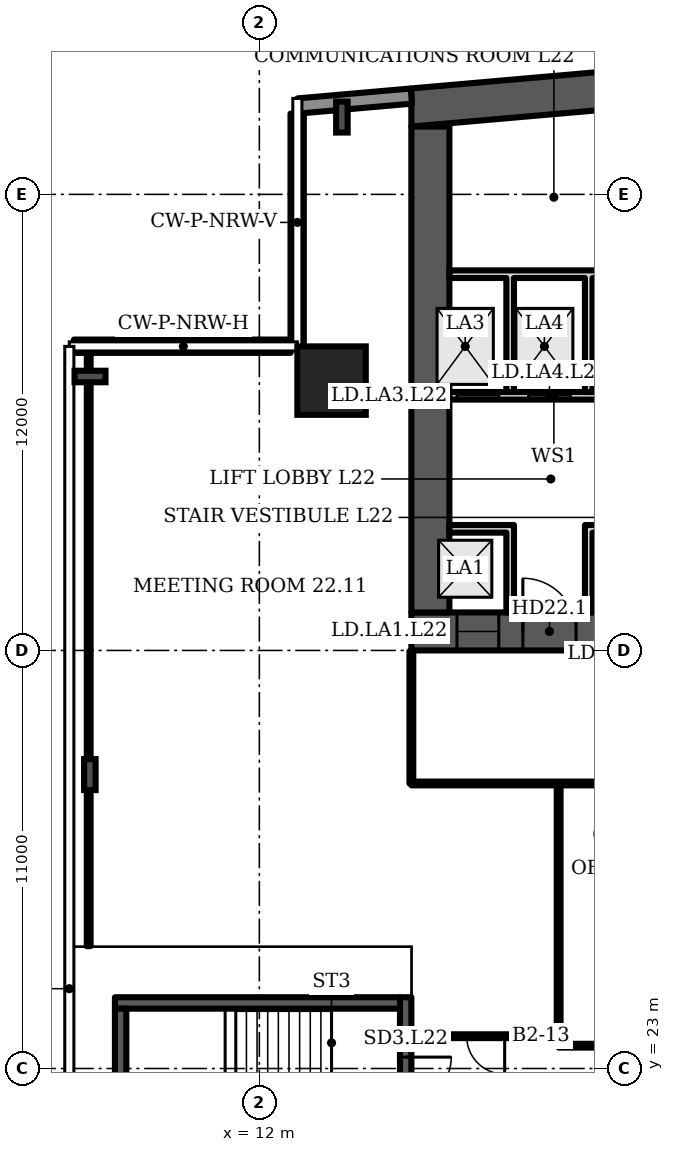
"""IFC4 building model, lengths in metres.
Left out: names, types, materials, properties, quantities, classifications, styles, units other than length and angle.
Written with IfcOpenShell. Run it as: python <this file> out.ifc"""

import sys

from ifc_helpers import new_model, si_unit, direction, frame, frame_2d, origin, origin_2d, place, context, subcontext, project, spatial, polyline, rectangle, i_section, outline, extrude, element, fill, save


model = new_model("IFC4")
c1 = context("Model", 3, precision=1e-05, world=origin(), true_north=direction((0.0, 1.0)))
c2 = subcontext(c1, "Body", "Model", "MODEL_VIEW")
j1 = project(units=[si_unit("LENGTHUNIT", "METRE"), si_unit("PLANEANGLEUNIT", "RADIAN")], contexts=[c1])
p1 = place(None, origin())
s1 = spatial("IfcSite", under=j1, at=p1, CompositionType="ELEMENT")
p2 = place(p1, origin())
s2 = spatial("IfcBuilding", under=s1, at=p2, CompositionType="ELEMENT")
p3 = place(p2, frame((0.0, 0.0, 100.3)))
s3 = spatial("IfcBuildingStorey", under=s2, at=p3, CompositionType="ELEMENT", Elevation=100.3)
p4 = place(p3, frame((0.0, 0.0, -0.0)))
e1 = element("IfcWall", 1, at=p4, inside=s3, PredefinedType="SHEAR", context=c2, shape_type="SweptSolid", body=[
    extrude(outline(polyline([(16.0, 47.784), (40.5, 49.927), (65.0, 47.784), (65.0, 48.787), (40.5, 50.931), (16.0, 48.787), (16.0, 47.784)])), origin(), (0.0, 0.0, 1.0), 3.6),
])
p5 = place(p3, frame((16.0, 34.5, 0.0), z_axis=(0.0, 0.0, 1.0), x_axis=(1.0, 0.0, 0.0)))
e2 = element("IfcWall", 2, at=p5, inside=s3, PredefinedType="SHEAR", context=c2, shape_type="SweptSolid", body=[
    extrude(rectangle(XDim=49.0, YDim=1.0, at=frame_2d((24.5, 0.0))), origin(), (0.0, 0.0, 1.0), 3.6),
])
p6 = place(p5, frame((1.2, 0.0, 0.0)))
e3 = element("IfcOpeningElement", 3, at=p6, cuts=e2, PredefinedType="OPENING", context=c2, shape_type="SweptSolid", body=[
    extrude(rectangle(XDim=1.1, YDim=2.1, at=frame_2d((0.55, 1.05))), frame((0.0, 0.51, 0.0), z_axis=(0.0, -1.0, 0.0), x_axis=(1.0, 0.0, 0.0)), (0.0, 0.0, 1.0), 1.02),
])
p7 = place(p5, frame((5.083, 0.0, 0.0)))
e4 = element("IfcOpeningElement", 4, at=p7, cuts=e2, PredefinedType="OPENING", context=c2, shape_type="SweptSolid", body=[
    extrude(rectangle(XDim=1.1, YDim=2.1, at=frame_2d((0.55, 1.05))), frame((0.0, 0.51, 0.0), z_axis=(0.0, -1.0, 0.0), x_axis=(1.0, 0.0, 0.0)), (0.0, 0.0, 1.0), 1.02),
])
p8 = place(p5, frame((2.933, 0.0, 0.0)))
e5 = element("IfcOpeningElement", 5, at=p8, cuts=e2, PredefinedType="OPENING", context=c2, shape_type="SweptSolid", body=[
    extrude(rectangle(XDim=1.4, YDim=2.1, at=frame_2d((0.7, 1.05))), frame((0.0, 0.51, 0.0), z_axis=(0.0, -1.0, 0.0), x_axis=(1.0, 0.0, 0.0)), (0.0, 0.0, 1.0), 1.02),
])
p9 = place(p5, frame((7.65, 0.0, 0.0)))
e6 = element("IfcOpeningElement", 6, at=p9, cuts=e2, PredefinedType="OPENING", context=c2, shape_type="SweptSolid", body=[
    extrude(rectangle(XDim=1.2, YDim=2.1, at=frame_2d((0.6, 1.05))), frame((0.0, 0.51, 0.0), z_axis=(0.0, -1.0, 0.0), x_axis=(1.0, 0.0, 0.0)), (0.0, 0.0, 1.0), 1.02),
])
p10 = place(p5, frame((14.817, 0.0, 0.0)))
e7 = element("IfcOpeningElement", 7, at=p10, cuts=e2, PredefinedType="OPENING", context=c2, shape_type="SweptSolid", body=[
    extrude(rectangle(XDim=1.1, YDim=2.1, at=frame_2d((0.55, 1.05))), frame((0.0, 0.51, 0.0), z_axis=(0.0, -1.0, 0.0), x_axis=(1.0, 0.0, 0.0)), (0.0, 0.0, 1.0), 1.02),
])
p11 = place(p5, frame((19.083, 0.0, 0.0)))
e8 = element("IfcOpeningElement", 8, at=p11, cuts=e2, PredefinedType="OPENING", context=c2, shape_type="SweptSolid", body=[
    extrude(rectangle(XDim=1.1, YDim=2.1, at=frame_2d((0.55, 1.05))), frame((0.0, 0.51, 0.0), z_axis=(0.0, -1.0, 0.0), x_axis=(1.0, 0.0, 0.0)), (0.0, 0.0, 1.0), 1.02),
])
p12 = place(p5, frame((16.8, 0.0, 0.0)))
e9 = element("IfcOpeningElement", 9, at=p12, cuts=e2, PredefinedType="OPENING", context=c2, shape_type="SweptSolid", body=[
    extrude(rectangle(XDim=1.4, YDim=2.1, at=frame_2d((0.7, 1.05))), frame((0.0, 0.51, 0.0), z_axis=(0.0, -1.0, 0.0), x_axis=(1.0, 0.0, 0.0)), (0.0, 0.0, 1.0), 1.02),
])
p13 = place(p5, frame((21.817, 0.0, 0.0)))
e10 = element("IfcOpeningElement", 10, at=p13, cuts=e2, PredefinedType="OPENING", context=c2, shape_type="SweptSolid", body=[
    extrude(rectangle(XDim=1.1, YDim=2.1, at=frame_2d((0.55, 1.05))), frame((0.0, 0.51, 0.0), z_axis=(0.0, -1.0, 0.0), x_axis=(1.0, 0.0, 0.0)), (0.0, 0.0, 1.0), 1.02),
])
p14 = place(p5, frame((26.083, 0.0, 0.0)))
e11 = element("IfcOpeningElement", 11, at=p14, cuts=e2, PredefinedType="OPENING", context=c2, shape_type="SweptSolid", body=[
    extrude(rectangle(XDim=1.1, YDim=2.1, at=frame_2d((0.55, 1.05))), frame((0.0, 0.51, 0.0), z_axis=(0.0, -1.0, 0.0), x_axis=(1.0, 0.0, 0.0)), (0.0, 0.0, 1.0), 1.02),
])
p15 = place(p5, frame((33.15, 0.0, 0.0)))
e12 = element("IfcOpeningElement", 12, at=p15, cuts=e2, PredefinedType="OPENING", context=c2, shape_type="SweptSolid", body=[
    extrude(rectangle(XDim=1.2, YDim=2.1, at=frame_2d((0.6, 1.05))), frame((0.0, 0.51, 0.0), z_axis=(0.0, -1.0, 0.0), x_axis=(1.0, 0.0, 0.0)), (0.0, 0.0, 1.0), 1.02),
])
p16 = place(p5, frame((37.8, 0.0, 0.0)))
e13 = element("IfcOpeningElement", 13, at=p16, cuts=e2, PredefinedType="OPENING", context=c2, shape_type="SweptSolid", body=[
    extrude(rectangle(XDim=1.4, YDim=2.1, at=frame_2d((0.7, 1.05))), frame((0.0, 0.51, 0.0), z_axis=(0.0, -1.0, 0.0), x_axis=(1.0, 0.0, 0.0)), (0.0, 0.0, 1.0), 1.02),
])
p17 = place(p5, frame((42.817, 0.0, 0.0)))
e14 = element("IfcOpeningElement", 14, at=p17, cuts=e2, PredefinedType="OPENING", context=c2, shape_type="SweptSolid", body=[
    extrude(rectangle(XDim=1.1, YDim=2.1, at=frame_2d((0.55, 1.05))), frame((0.0, 0.51, 0.0), z_axis=(0.0, -1.0, 0.0), x_axis=(1.0, 0.0, 0.0)), (0.0, 0.0, 1.0), 1.02),
])
p18 = place(p5, frame((46.7, 0.0, 0.0)))
e15 = element("IfcOpeningElement", 15, at=p18, cuts=e2, PredefinedType="OPENING", context=c2, shape_type="SweptSolid", body=[
    extrude(rectangle(XDim=1.1, YDim=2.1, at=frame_2d((0.55, 1.05))), frame((0.0, 0.51, 0.0), z_axis=(0.0, -1.0, 0.0), x_axis=(1.0, 0.0, 0.0)), (0.0, 0.0, 1.0), 1.02),
])
p19 = place(p5, frame((44.667, 0.0, 0.0)))
e16 = element("IfcOpeningElement", 16, at=p19, cuts=e2, PredefinedType="OPENING", context=c2, shape_type="SweptSolid", body=[
    extrude(rectangle(XDim=1.4, YDim=2.1, at=frame_2d((0.7, 1.05))), frame((0.0, 0.51, 0.0), z_axis=(0.0, -1.0, 0.0), x_axis=(1.0, 0.0, 0.0)), (0.0, 0.0, 1.0), 1.02),
])
p20 = place(p3, frame((16.5, 35.0, 0.0), z_axis=(0.0, 0.0, 1.0), x_axis=(0.0, 1.0, 0.0)))
e17 = element("IfcWall", 17, at=p20, inside=s3, PredefinedType="SHEAR", context=c2, shape_type="SweptSolid", body=[
    extrude(rectangle(XDim=12.784, YDim=1.0, at=frame_2d((6.392, 0.0))), origin(), (0.0, 0.0, 1.0), 3.6),
])
p21 = place(p3, frame((13.9, 41.1, 0.0), z_axis=(0.0, 0.0, 1.0), x_axis=(1.0, 0.0, 0.0)))
e18 = element("IfcColumn", 18, at=p21, inside=s3, PredefinedType="COLUMN", context=c2, shape_type="SweptSolid", body=[
    extrude(rectangle(XDim=1.8, YDim=1.8, at=origin_2d()), origin(), (0.0, 0.0, 1.0), 3.6),
])
for number, where, z_axis, x_axis in (
    (19, (14.172, 48.034, 0.0), (0.0, 0.0, 1.0), (-1.0, 0.0, 0.0)),
    (20, (7.544, 41.208, 0.0), (0.0, 0.0, 1.0), (0.0, 1.0, 0.0)),
    (21, (7.54, 30.733, 0.0), (0.0, 0.0, 1.0), (-1.0, 0.0, 0.0)),
):
    element("IfcColumn", number, at=place(p3, frame(where, z_axis=z_axis, x_axis=x_axis)), inside=s3, PredefinedType="COLUMN", context=c2, shape_type="SweptSolid", body=[
        extrude(i_section(OverallWidth=0.303, OverallDepth=0.814, WebThickness=0.021, FlangeThickness=0.04, FilletRadius=0.03, at=origin_2d()), origin(), (0.0, 0.0, 1.0), 3.6),
    ])
p22 = place(p3, frame((16.0, 48.587, 0.0), z_axis=(0.0, 0.0, 1.0), x_axis=(-0.996194, -0.087168, 0.0)))
e22 = element("IfcWall", 22, at=p22, inside=s3, PredefinedType="SOLIDWALL", context=c2, shape_type="SweptSolid", body=[
    extrude(rectangle(XDim=2.994, YDim=0.4, at=frame_2d((1.497, 0.0))), origin(), (0.0, 0.0, 1.0), 3.2),
])
p23 = place(p3, frame((12.995, 48.126, 0.0), z_axis=(0.0, 0.0, 1.0), x_axis=(0.0, -1.0, 0.0)))
e23 = element("IfcWall", 23, at=p23, inside=s3, PredefinedType="SOLIDWALL", context=c2, shape_type="SweptSolid", body=[
    extrude(rectangle(XDim=6.126, YDim=0.35, at=frame_2d((3.063, 0.0))), origin(), (0.0, 0.0, 1.0), 1.0),
])
p24 = place(p3, frame((12.82, 42.005, 0.0), z_axis=(0.0, 0.0, 1.0), x_axis=(-1.0, 0.0, 0.0)))
e24 = element("IfcWall", 24, at=p24, inside=s3, PredefinedType="SOLIDWALL", context=c2, shape_type="SweptSolid", body=[
    extrude(rectangle(XDim=5.7, YDim=0.35, at=frame_2d((2.85, 0.0))), origin(), (0.0, 0.0, 1.0), 1.0),
])
p25 = place(p3, frame((17.0, 40.7, 0.0), z_axis=(0.0, 0.0, 1.0), x_axis=(1.0, 0.0, 0.0)))
e25 = element("IfcWall", 25, at=p25, inside=s3, PredefinedType="PARTITIONING", context=c2, shape_type="SweptSolid", body=[
    extrude(rectangle(XDim=5.5, YDim=0.2, at=frame_2d((2.75, 0.0))), origin(), (0.0, 0.0, 1.0), 3.2),
])
p26 = place(p25, frame((0.2, 0.0, 0.0)))
e26 = element("IfcOpeningElement", 26, at=p26, cuts=e25, PredefinedType="OPENING", context=c2, shape_type="SweptSolid", body=[
    extrude(rectangle(XDim=1.1, YDim=2.1, at=frame_2d((0.55, 1.05))), frame((0.0, 0.11, 0.0), z_axis=(0.0, -1.0, 0.0), x_axis=(1.0, 0.0, 0.0)), (0.0, 0.0, 1.0), 0.22),
])
p27 = place(p25, frame((2.083, 0.0, 0.0)))
e27 = element("IfcOpeningElement", 27, at=p27, cuts=e25, PredefinedType="OPENING", context=c2, shape_type="SweptSolid", body=[
    extrude(rectangle(XDim=1.1, YDim=2.1, at=frame_2d((0.55, 1.05))), frame((0.0, 0.11, 0.0), z_axis=(0.0, -1.0, 0.0), x_axis=(1.0, 0.0, 0.0)), (0.0, 0.0, 1.0), 0.22),
])
p28 = place(p25, frame((4.083, 0.0, 0.0)))
e28 = element("IfcOpeningElement", 28, at=p28, cuts=e25, PredefinedType="OPENING", context=c2, shape_type="SweptSolid", body=[
    extrude(rectangle(XDim=1.1, YDim=2.1, at=frame_2d((0.55, 1.05))), frame((0.0, 0.11, 0.0), z_axis=(0.0, -1.0, 0.0), x_axis=(1.0, 0.0, 0.0)), (0.0, 0.0, 1.0), 0.22),
])
p29 = place(p3, frame((0.0, 0.0, -0.0)))
e29 = element("IfcWall", 29, at=p29, inside=s3, PredefinedType="PARTITIONING", context=c2, shape_type="SweptSolid", body=[
    extrude(outline(polyline([(18.5, 37.1), (17.0, 37.1), (17.0, 37.3), (18.5, 37.3), (18.7, 37.3), (18.7, 35.0), (18.5, 35.0), (18.5, 37.1)])), origin(), (0.0, 0.0, 1.0), 3.2),
])
p30 = place(p3, frame((0.0, 0.0, -0.0)))
e30 = element("IfcWall", 30, at=p30, inside=s3, PredefinedType="PARTITIONING", context=c2, shape_type="SweptSolid", body=[
    extrude(outline(polyline([(20.567, 37.3), (20.767, 37.3), (22.5, 37.3), (22.5, 37.1), (20.767, 37.1), (20.767, 35.0), (20.567, 35.0), (20.567, 37.3)])), origin(), (0.0, 0.0, 1.0), 3.2),
])
p31 = place(p3, frame((0.0, 0.0, -0.0)))
e31 = element("IfcWall", 31, at=p31, inside=s3, PredefinedType="PARTITIONING", context=c2, shape_type="SweptSolid", body=[
    extrude(outline(polyline([(18.7, 40.8), (18.5, 40.8), (18.5, 43.8), (17.0, 43.8), (17.0, 44.0), (22.5, 44.0), (22.5, 43.8), (20.767, 43.8), (20.767, 40.8), (20.567, 40.8), (20.567, 43.8), (18.7, 43.8), (18.7, 40.8)])), origin(), (0.0, 0.0, 1.0), 3.2),
])
p32 = place(p3, frame((15.85, 20.525, 0.0), z_axis=(0.0, 0.0, 1.0), x_axis=(0.0, 1.0, 0.0)))
e32 = element("IfcWall", 32, at=p32, inside=s3, PredefinedType="SHEAR", context=c2, shape_type="SweptSolid", body=[
    extrude(rectangle(XDim=4.35, YDim=0.3, at=frame_2d((2.175, 0.0))), origin(), (0.0, 0.0, 1.0), 3.2),
])
p33 = place(p32, frame((1.575, 0.0, 0.0)))
e33 = element("IfcOpeningElement", 33, at=p33, cuts=e32, PredefinedType="OPENING", context=c2, shape_type="SweptSolid", body=[
    extrude(rectangle(XDim=1.2, YDim=2.1, at=frame_2d((0.6, 1.05))), frame((0.0, 0.16, 0.0), z_axis=(0.0, -1.0, 0.0), x_axis=(1.0, 0.0, 0.0)), (0.0, 0.0, 1.0), 0.32),
])
p34 = place(p3, frame((7.51, 26.22, 0.0), z_axis=(0.0, 0.0, 1.0), x_axis=(0.0, 1.0, 0.0)))
e34 = element("IfcWall", 34, at=p34, inside=s3, PredefinedType="PARTITIONING", context=c2, shape_type="SweptSolid", body=[
    extrude(rectangle(XDim=15.76, YDim=0.1, at=frame_2d((7.88, 0.0))), origin(), (0.0, 0.0, 1.0), 2.58),
])
p35 = place(p3, frame((16.0, 30.5, 0.0), z_axis=(0.0, 0.0, 1.0), x_axis=(0.0, 1.0, 0.0)))
e35 = element("IfcWall", 35, at=p35, inside=s3, PredefinedType="PARTITIONING", context=c2, shape_type="SweptSolid", body=[
    extrude(rectangle(XDim=3.48, YDim=0.1, at=frame_2d((1.74, 0.0))), origin(), (0.0, 0.0, 1.0), 3.2),
])
p36 = place(p3, frame((16.0, 30.5, 0.0), z_axis=(0.0, 0.0, 1.0), x_axis=(1.0, 0.0, 0.0)))
e36 = element("IfcWall", 36, at=p36, inside=s3, PredefinedType="PARTITIONING", context=c2, shape_type="SweptSolid", body=[
    extrude(rectangle(XDim=20.85, YDim=0.1, at=frame_2d((10.425, 0.0))), origin(), (0.0, 0.0, 1.0), 3.2),
])
p37 = place(p36, frame((6.895, 0.0, 0.0)))
e37 = element("IfcOpeningElement", 37, at=p37, cuts=e36, PredefinedType="OPENING", context=c2, shape_type="SweptSolid", body=[
    extrude(rectangle(XDim=1.0, YDim=2.1, at=frame_2d((0.5, 1.05))), frame((0.0, 0.06, 0.0), z_axis=(0.0, -1.0, 0.0), x_axis=(1.0, 0.0, 0.0)), (0.0, 0.0, 1.0), 0.12),
])
p38 = place(p36, frame((15.37, 0.0, 0.0)))
e38 = element("IfcOpeningElement", 38, at=p38, cuts=e36, PredefinedType="OPENING", context=c2, shape_type="SweptSolid", body=[
    extrude(rectangle(XDim=1.0, YDim=2.1, at=frame_2d((0.5, 1.05))), frame((0.0, 0.06, 0.0), z_axis=(0.0, -1.0, 0.0), x_axis=(1.0, 0.0, 0.0)), (0.0, 0.0, 1.0), 0.12),
])
p39 = place(p3, frame((16.02, 23.85, 0.0), z_axis=(0.0, 0.0, 1.0), x_axis=(1.0, 0.0, 0.0)))
e39 = element("IfcWall", 39, at=p39, inside=s3, PredefinedType="PARTITIONING", context=c2, shape_type="SweptSolid", body=[
    extrude(rectangle(XDim=3.855, YDim=0.1, at=frame_2d((1.927, 0.0))), origin(), (0.0, 0.0, 1.0), 3.2),
])
p40 = place(p39, frame((1.435, 0.0, 0.0)))
e40 = element("IfcOpeningElement", 40, at=p40, cuts=e39, PredefinedType="OPENING", context=c2, shape_type="SweptSolid", body=[
    extrude(rectangle(XDim=1.0, YDim=2.1, at=frame_2d((0.5, 1.05))), frame((0.0, 0.06, 0.0), z_axis=(0.0, -1.0, 0.0), x_axis=(1.0, 0.0, 0.0)), (0.0, 0.0, 1.0), 0.12),
])
p41 = place(p3, frame((19.875, 23.6, 0.0), z_axis=(0.0, 0.0, 1.0), x_axis=(0.0, 1.0, 0.0)))
e41 = element("IfcWall", 41, at=p41, inside=s3, PredefinedType="PARTITIONING", context=c2, shape_type="SweptSolid", body=[
    extrude(rectangle(XDim=6.9, YDim=0.1, at=frame_2d((3.45, 0.0))), origin(), (0.0, 0.0, 1.0), 3.2),
])
p42 = place(p3, frame((19.875, 23.6, 0.0), z_axis=(0.0, 0.0, 1.0), x_axis=(1.0, 0.0, 0.0)))
e42 = element("IfcWall", 42, at=p42, inside=s3, PredefinedType="PARTITIONING", context=c2, shape_type="SweptSolid", body=[
    extrude(rectangle(XDim=1.325, YDim=0.1, at=frame_2d((0.663, 0.0))), origin(), (0.0, 0.0, 1.0), 3.2),
])
p43 = place(p3, frame((8.2, 24.725, 0.0), z_axis=(0.0, 0.0, 1.0), x_axis=(1.0, 0.0, 0.0)))
e43 = element("IfcWall", 43, at=p43, inside=s3, PredefinedType="SHEAR", context=c2, shape_type="SweptSolid", body=[
    extrude(rectangle(XDim=7.5, YDim=0.3, at=frame_2d((3.75, 0.0))), origin(), (0.0, 0.0, 1.0), 3.2),
])
p44 = place(p3, frame((8.35, 20.825, 0.0), z_axis=(0.0, 0.0, 1.0), x_axis=(0.0, 1.0, 0.0)))
e44 = element("IfcWall", 44, at=p44, inside=s3, PredefinedType="SHEAR", context=c2, shape_type="SweptSolid", body=[
    extrude(rectangle(XDim=3.75, YDim=0.3, at=frame_2d((1.875, 0.0))), origin(), (0.0, 0.0, 1.0), 3.2),
])
p45 = place(p6, origin())
e45 = element("IfcDoor", 45, at=p45, inside=s3, OperationType="DOUBLE_DOOR_SLIDING", PredefinedType="DOOR", context=c2, shape_type="SweptSolid", body=[
    extrude(rectangle(XDim=1.1, YDim=2.1, at=frame_2d((0.55, 1.05))), frame((0.0, 0.025, 0.0), z_axis=(0.0, -1.0, 0.0), x_axis=(1.0, 0.0, 0.0)), (0.0, 0.0, 1.0), 0.05),
])
fill(e3, e45)
p46 = place(p8, origin())
e46 = element("IfcDoor", 46, at=p46, inside=s3, OperationType="DOUBLE_DOOR_SINGLE_SWING", PredefinedType="DOOR", context=c2, shape_type="SweptSolid", body=[
    extrude(rectangle(XDim=1.4, YDim=2.1, at=frame_2d((0.7, 1.05))), frame((0.0, 0.025, 0.0), z_axis=(0.0, -1.0, 0.0), x_axis=(1.0, 0.0, 0.0)), (0.0, 0.0, 1.0), 0.05),
])
fill(e5, e46)
p47 = place(p26, origin())
e47 = element("IfcDoor", 47, at=p47, inside=s3, OperationType="DOUBLE_DOOR_SLIDING", PredefinedType="DOOR", context=c2, shape_type="SweptSolid", body=[
    extrude(rectangle(XDim=1.1, YDim=2.1, at=frame_2d((0.55, 1.05))), frame((0.0, 0.025, 0.0), z_axis=(0.0, -1.0, 0.0), x_axis=(1.0, 0.0, 0.0)), (0.0, 0.0, 1.0), 0.05),
])
fill(e26, e47)
p48 = place(p27, origin())
e48 = element("IfcDoor", 48, at=p48, inside=s3, OperationType="DOUBLE_DOOR_SLIDING", PredefinedType="DOOR", context=c2, shape_type="SweptSolid", body=[
    extrude(rectangle(XDim=1.1, YDim=2.1, at=frame_2d((0.55, 1.05))), frame((0.0, 0.025, 0.0), z_axis=(0.0, -1.0, 0.0), x_axis=(1.0, 0.0, 0.0)), (0.0, 0.0, 1.0), 0.05),
])
fill(e27, e48)
p49 = place(p33, origin())
e49 = element("IfcDoor", 49, at=p49, inside=s3, OperationType="SINGLE_SWING_RIGHT", PredefinedType="DOOR", context=c2, shape_type="SweptSolid", body=[
    extrude(rectangle(XDim=1.2, YDim=2.1, at=frame_2d((0.6, 1.05))), frame((0.0, 0.025, 0.0), z_axis=(0.0, -1.0, 0.0), x_axis=(1.0, 0.0, 0.0)), (0.0, 0.0, 1.0), 0.05),
])
fill(e33, e49)
p50 = place(p40, origin())
e50 = element("IfcDoor", 50, at=p50, inside=s3, OperationType="SINGLE_SWING_RIGHT", PredefinedType="DOOR", context=c2, shape_type="SweptSolid", body=[
    extrude(rectangle(XDim=1.0, YDim=2.1, at=frame_2d((0.5, 1.05))), frame((0.0, 0.025, 0.0), z_axis=(0.0, -1.0, 0.0), x_axis=(1.0, 0.0, 0.0)), (0.0, 0.0, 1.0), 0.05),
])
fill(e40, e50)
save(model, sys.argv[1])
